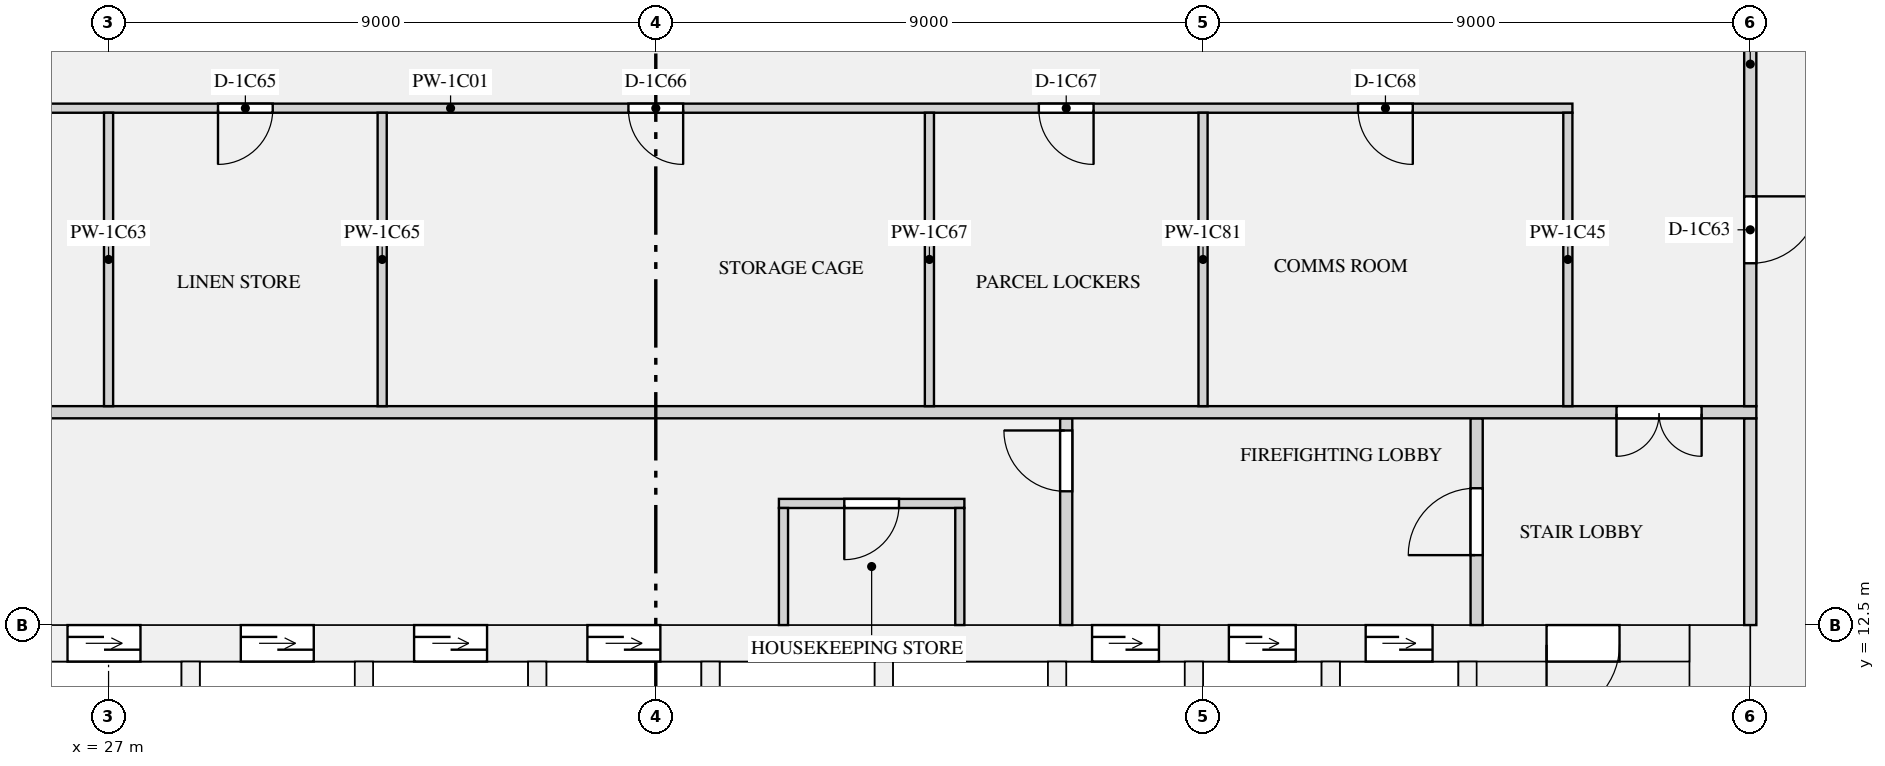
"""IFC4 building model, lengths in metres.
Left out: names, types, materials, properties, quantities, classifications, styles, units other than length and angle.
Written with IfcOpenShell. Run it as: python <this file> out.ifc"""

import sys

from ifc_helpers import new_model, si_unit, direction, frame, frame_2d, origin, place, context, subcontext, project, spatial, rectangle, extrude, element, fill, save


model = new_model("IFC4")
c1 = context("Model", 3, precision=1e-05, world=origin(), true_north=direction((0.0, 1.0)))
c2 = subcontext(c1, "Body", "Model", "MODEL_VIEW")
j1 = project(units=[si_unit("LENGTHUNIT", "METRE"), si_unit("PLANEANGLEUNIT", "RADIAN")], contexts=[c1])
p1 = place(None, origin())
s1 = spatial("IfcSite", under=j1, at=p1, CompositionType="ELEMENT")
p2 = place(p1, origin())
s2 = spatial("IfcBuilding", under=s1, at=p2, CompositionType="ELEMENT")
p3 = place(p2, frame((0.0, 0.0, 38.4)))
s3 = spatial("IfcBuildingStorey", under=s2, at=p3, CompositionType="ELEMENT", Elevation=38.4)
p4 = place(p3, frame((53.5, 0.0, 0.0), z_axis=(0.0, 0.0, 1.0), x_axis=(0.0, 1.0, 0.0)))
e1 = element("IfcWall", 1, at=p4, inside=s3, PredefinedType="SHEAR", context=c2, shape_type="SweptSolid", body=[
    extrude(rectangle(XDim=12.5, YDim=1.0, at=frame_2d((6.25, 0.0))), origin(), (0.0, 0.0, 1.0), 3.15),
])
p5 = place(p3, frame((19.0, 12.2, 0.0), z_axis=(0.0, 0.0, 1.0), x_axis=(1.0, 0.0, 0.0)))
e2 = element("IfcWall", 2, at=p5, inside=s3, PredefinedType="SHEAR", context=c2, shape_type="SweptSolid", body=[
    extrude(rectangle(XDim=34.0, YDim=0.6, at=frame_2d((17.0, 0.0))), origin(), (0.0, 0.0, 1.0), 3.15),
])
p6 = place(p5, frame((4.475, 0.0, 0.0)))
e3 = element("IfcOpeningElement", 3, at=p6, cuts=e2, PredefinedType="OPENING", context=c2, shape_type="SweptSolid", body=[
    extrude(rectangle(XDim=1.2, YDim=2.1, at=frame_2d((0.6, 1.05))), frame((0.0, 0.31, 0.0), z_axis=(0.0, -1.0, 0.0), x_axis=(1.0, 0.0, 0.0)), (0.0, 0.0, 1.0), 0.62),
])
p7 = place(p5, frame((7.325, 0.0, 0.0)))
e4 = element("IfcOpeningElement", 4, at=p7, cuts=e2, PredefinedType="OPENING", context=c2, shape_type="SweptSolid", body=[
    extrude(rectangle(XDim=1.2, YDim=2.1, at=frame_2d((0.6, 1.05))), frame((0.0, 0.31, 0.0), z_axis=(0.0, -1.0, 0.0), x_axis=(1.0, 0.0, 0.0)), (0.0, 0.0, 1.0), 0.62),
])
p8 = place(p5, frame((10.175, 0.0, 0.0)))
e5 = element("IfcOpeningElement", 5, at=p8, cuts=e2, PredefinedType="OPENING", context=c2, shape_type="SweptSolid", body=[
    extrude(rectangle(XDim=1.2, YDim=2.1, at=frame_2d((0.6, 1.05))), frame((0.0, 0.31, 0.0), z_axis=(0.0, -1.0, 0.0), x_axis=(1.0, 0.0, 0.0)), (0.0, 0.0, 1.0), 0.62),
])
p9 = place(p5, frame((13.025, 0.0, 0.0)))
e6 = element("IfcOpeningElement", 6, at=p9, cuts=e2, PredefinedType="OPENING", context=c2, shape_type="SweptSolid", body=[
    extrude(rectangle(XDim=1.2, YDim=2.1, at=frame_2d((0.6, 1.05))), frame((0.0, 0.31, 0.0), z_axis=(0.0, -1.0, 0.0), x_axis=(1.0, 0.0, 0.0)), (0.0, 0.0, 1.0), 0.62),
])
p10 = place(p5, frame((15.875, 0.0, 0.0)))
e7 = element("IfcOpeningElement", 7, at=p10, cuts=e2, PredefinedType="OPENING", context=c2, shape_type="SweptSolid", body=[
    extrude(rectangle(XDim=1.2, YDim=2.1, at=frame_2d((0.6, 1.05))), frame((0.0, 0.31, 0.0), z_axis=(0.0, -1.0, 0.0), x_axis=(1.0, 0.0, 0.0)), (0.0, 0.0, 1.0), 0.62),
])
p11 = place(p5, frame((24.175, 0.0, 0.0)))
e8 = element("IfcOpeningElement", 8, at=p11, cuts=e2, PredefinedType="OPENING", context=c2, shape_type="SweptSolid", body=[
    extrude(rectangle(XDim=1.1, YDim=2.1, at=frame_2d((0.55, 1.05))), frame((0.0, 0.31, 0.0), z_axis=(0.0, -1.0, 0.0), x_axis=(1.0, 0.0, 0.0)), (0.0, 0.0, 1.0), 0.62),
])
p12 = place(p5, frame((26.425, 0.0, 0.0)))
e9 = element("IfcOpeningElement", 9, at=p12, cuts=e2, PredefinedType="OPENING", context=c2, shape_type="SweptSolid", body=[
    extrude(rectangle(XDim=1.1, YDim=2.1, at=frame_2d((0.55, 1.05))), frame((0.0, 0.31, 0.0), z_axis=(0.0, -1.0, 0.0), x_axis=(1.0, 0.0, 0.0)), (0.0, 0.0, 1.0), 0.62),
])
p13 = place(p5, frame((28.675, 0.0, 0.0)))
e10 = element("IfcOpeningElement", 10, at=p13, cuts=e2, PredefinedType="OPENING", context=c2, shape_type="SweptSolid", body=[
    extrude(rectangle(XDim=1.1, YDim=2.1, at=frame_2d((0.55, 1.05))), frame((0.0, 0.31, 0.0), z_axis=(0.0, -1.0, 0.0), x_axis=(1.0, 0.0, 0.0)), (0.0, 0.0, 1.0), 0.62),
])
p14 = place(p5, frame((1.15, 0.0, 0.0)))
e11 = element("IfcOpeningElement", 11, at=p14, cuts=e2, PredefinedType="OPENING", context=c2, shape_type="SweptSolid", body=[
    extrude(rectangle(XDim=1.2, YDim=2.1, at=frame_2d((0.6, 1.05))), frame((0.0, 0.31, 0.0), z_axis=(0.0, -1.0, 0.0), x_axis=(1.0, 0.0, 0.0)), (0.0, 0.0, 1.0), 0.62),
])
p15 = place(p5, frame((31.65, 0.0, 0.0)))
e12 = element("IfcOpeningElement", 12, at=p15, cuts=e2, PredefinedType="OPENING", context=c2, shape_type="SweptSolid", body=[
    extrude(rectangle(XDim=1.2, YDim=2.1, at=frame_2d((0.6, 1.05))), frame((0.0, 0.31, 0.0), z_axis=(0.0, -1.0, 0.0), x_axis=(1.0, 0.0, 0.0)), (0.0, 0.0, 1.0), 0.62),
])
for number, where, z_axis, x_axis in (
    (13, (28.35, 9.35, 0.0), (0.0, 0.0, 1.0), (0.0, 1.0, 0.0)),
    (14, (31.2, 9.35, 0.0), (0.0, 0.0, 1.0), (0.0, 1.0, 0.0)),
    (15, (34.05, 9.35, 0.0), (0.0, 0.0, 1.0), (0.0, 1.0, 0.0)),
    (16, (36.9, 9.35, 0.0), (0.0, 0.0, 1.0), (0.0, 1.0, 0.0)),
    (17, (39.75, 9.35, 0.0), (0.0, 0.0, 1.0), (0.0, 1.0, 0.0)),
):
    element("IfcWall", number, at=place(p3, frame(where, z_axis=z_axis, x_axis=x_axis)), inside=s3, PredefinedType="SHEAR", context=c2, shape_type="SweptSolid", body=[
        extrude(rectangle(XDim=2.55, YDim=0.3, at=frame_2d((1.275, 0.0))), origin(), (0.0, 0.0, 1.0), 3.15),
    ])
for number, where, z_axis, x_axis in (
    (18, (42.6, 8.25, 0.0), (0.0, 0.0, 1.0), (0.0, 1.0, 0.0)),
    (19, (44.85, 8.25, 0.0), (0.0, 0.0, 1.0), (0.0, 1.0, 0.0)),
    (20, (47.1, 8.25, 0.0), (0.0, 0.0, 1.0), (0.0, 1.0, 0.0)),
    (21, (49.35, 8.25, 0.0), (0.0, 0.0, 1.0), (0.0, 1.0, 0.0)),
):
    element("IfcWall", number, at=place(p3, frame(where, z_axis=z_axis, x_axis=x_axis)), inside=s3, PredefinedType="SHEAR", context=c2, shape_type="SweptSolid", body=[
        extrude(rectangle(XDim=3.65, YDim=0.3, at=frame_2d((1.825, 0.0))), origin(), (0.0, 0.0, 1.0), 3.15),
    ])
p16 = place(p3, frame((38.025, 14.5, 0.0), z_axis=(0.0, 0.0, 1.0), x_axis=(1.0, 0.0, 0.0)))
e22 = element("IfcWall", 22, at=p16, inside=s3, PredefinedType="PARTITIONING", context=c2, shape_type="SweptSolid", body=[
    extrude(rectangle(XDim=3.05, YDim=0.15, at=frame_2d((1.525, 0.0))), origin(), (0.0, 0.0, 1.0), 2.83),
])
p17 = place(p16, frame((1.075, 0.0, 0.0)))
e23 = element("IfcOpeningElement", 23, at=p17, cuts=e22, PredefinedType="OPENING", context=c2, shape_type="SweptSolid", body=[
    extrude(rectangle(XDim=0.9, YDim=2.1, at=frame_2d((0.45, 1.05))), frame((0.0, 0.085, 0.0), z_axis=(0.0, -1.0, 0.0), x_axis=(1.0, 0.0, 0.0)), (0.0, 0.0, 1.0), 0.17),
])
for number, where, z_axis, x_axis in (
    (24, (38.1, 12.5, 0.0), (0.0, 0.0, 1.0), (0.0, 1.0, 0.0)),
    (25, (41.0, 12.5, 0.0), (0.0, 0.0, 1.0), (0.0, 1.0, 0.0)),
):
    element("IfcWall", number, at=place(p3, frame(where, z_axis=z_axis, x_axis=x_axis)), inside=s3, PredefinedType="PARTITIONING", context=c2, shape_type="SweptSolid", body=[
        extrude(rectangle(XDim=1.925, YDim=0.15, at=frame_2d((0.962, 0.0))), origin(), (0.0, 0.0, 1.0), 2.83),
    ])
p18 = place(p3, frame((42.75, 12.5, 0.0), z_axis=(0.0, 0.0, 1.0), x_axis=(0.0, 1.0, 0.0)))
e26 = element("IfcWall", 26, at=p18, inside=s3, PredefinedType="PARTITIONING", context=c2, shape_type="SweptSolid", body=[
    extrude(rectangle(XDim=3.4, YDim=0.2, at=frame_2d((1.7, 0.0))), origin(), (0.0, 0.0, 1.0), 2.83),
])
p19 = place(p18, frame((2.2, 0.0, 0.0)))
e27 = element("IfcOpeningElement", 27, at=p19, cuts=e26, PredefinedType="OPENING", context=c2, shape_type="SweptSolid", body=[
    extrude(rectangle(XDim=1.0, YDim=2.1, at=frame_2d((0.5, 1.05))), frame((0.0, 0.11, 0.0), z_axis=(0.0, -1.0, 0.0), x_axis=(1.0, 0.0, 0.0)), (0.0, 0.0, 1.0), 0.22),
])
p20 = place(p3, frame((49.5, 12.5, 0.0), z_axis=(0.0, 0.0, 1.0), x_axis=(0.0, 1.0, 0.0)))
e28 = element("IfcWall", 28, at=p20, inside=s3, PredefinedType="PARTITIONING", context=c2, shape_type="SweptSolid", body=[
    extrude(rectangle(XDim=3.4, YDim=0.2, at=frame_2d((1.7, 0.0))), origin(), (0.0, 0.0, 1.0), 2.83),
])
p21 = place(p20, frame((1.15, 0.0, 0.0)))
e29 = element("IfcOpeningElement", 29, at=p21, cuts=e28, PredefinedType="OPENING", context=c2, shape_type="SweptSolid", body=[
    extrude(rectangle(XDim=1.1, YDim=2.1, at=frame_2d((0.55, 1.05))), frame((0.0, 0.11, 0.0), z_axis=(0.0, -1.0, 0.0), x_axis=(1.0, 0.0, 0.0)), (0.0, 0.0, 1.0), 0.22),
])
p22 = place(p3, frame((54.0, 12.5, 0.0), z_axis=(0.0, 0.0, 1.0), x_axis=(0.0, 1.0, 0.0)))
e30 = element("IfcWall", 30, at=p22, inside=s3, PredefinedType="PARTITIONING", context=c2, shape_type="SweptSolid", body=[
    extrude(rectangle(XDim=3.4, YDim=0.2, at=frame_2d((1.7, 0.0))), origin(), (0.0, 0.0, 1.0), 2.83),
])
p23 = place(p3, frame((20.925, 21.0, 0.0), z_axis=(0.0, 0.0, 1.0), x_axis=(1.0, 0.0, 0.0)))
e31 = element("IfcWall", 31, at=p23, inside=s3, PredefinedType="PARTITIONING", context=c2, shape_type="SweptSolid", body=[
    extrude(rectangle(XDim=30.15, YDim=0.15, at=frame_2d((15.075, 0.0))), origin(), (0.0, 0.0, 1.0), 2.83),
])
p24 = place(p23, frame((2.625, 0.0, 0.0)))
e32 = element("IfcOpeningElement", 32, at=p24, cuts=e31, PredefinedType="OPENING", context=c2, shape_type="SweptSolid", body=[
    extrude(rectangle(XDim=0.9, YDim=2.1, at=frame_2d((0.45, 1.05))), frame((0.0, 0.085, 0.0), z_axis=(0.0, -1.0, 0.0), x_axis=(1.0, 0.0, 0.0)), (0.0, 0.0, 1.0), 0.17),
])
p25 = place(p23, frame((7.875, 0.0, 0.0)))
e33 = element("IfcOpeningElement", 33, at=p25, cuts=e31, PredefinedType="OPENING", context=c2, shape_type="SweptSolid", body=[
    extrude(rectangle(XDim=0.9, YDim=2.1, at=frame_2d((0.45, 1.05))), frame((0.0, 0.085, 0.0), z_axis=(0.0, -1.0, 0.0), x_axis=(1.0, 0.0, 0.0)), (0.0, 0.0, 1.0), 0.17),
])
p26 = place(p23, frame((14.625, 0.0, 0.0)))
e34 = element("IfcOpeningElement", 34, at=p26, cuts=e31, PredefinedType="OPENING", context=c2, shape_type="SweptSolid", body=[
    extrude(rectangle(XDim=0.9, YDim=2.1, at=frame_2d((0.45, 1.05))), frame((0.0, 0.085, 0.0), z_axis=(0.0, -1.0, 0.0), x_axis=(1.0, 0.0, 0.0)), (0.0, 0.0, 1.0), 0.17),
])
p27 = place(p23, frame((21.375, 0.0, 0.0)))
e35 = element("IfcOpeningElement", 35, at=p27, cuts=e31, PredefinedType="OPENING", context=c2, shape_type="SweptSolid", body=[
    extrude(rectangle(XDim=0.9, YDim=2.1, at=frame_2d((0.45, 1.05))), frame((0.0, 0.085, 0.0), z_axis=(0.0, -1.0, 0.0), x_axis=(1.0, 0.0, 0.0)), (0.0, 0.0, 1.0), 0.17),
])
p28 = place(p23, frame((26.625, 0.0, 0.0)))
e36 = element("IfcOpeningElement", 36, at=p28, cuts=e31, PredefinedType="OPENING", context=c2, shape_type="SweptSolid", body=[
    extrude(rectangle(XDim=0.9, YDim=2.1, at=frame_2d((0.45, 1.05))), frame((0.0, 0.085, 0.0), z_axis=(0.0, -1.0, 0.0), x_axis=(1.0, 0.0, 0.0)), (0.0, 0.0, 1.0), 0.17),
])
p29 = place(p3, frame((17.9, 16.0, 0.0), z_axis=(0.0, 0.0, 1.0), x_axis=(1.0, 0.0, 0.0)))
e37 = element("IfcWall", 37, at=p29, inside=s3, PredefinedType="PARTITIONING", context=c2, shape_type="SweptSolid", body=[
    extrude(rectangle(XDim=36.2, YDim=0.2, at=frame_2d((18.1, 0.0))), origin(), (0.0, 0.0, 1.0), 2.83),
])
p30 = place(p29, frame((0.9, 0.0, 0.0)))
e38 = element("IfcOpeningElement", 38, at=p30, cuts=e37, PredefinedType="OPENING", context=c2, shape_type="SweptSolid", body=[
    extrude(rectangle(XDim=1.4, YDim=2.1, at=frame_2d((0.7, 1.05))), frame((0.0, 0.11, 0.0), z_axis=(0.0, -1.0, 0.0), x_axis=(1.0, 0.0, 0.0)), (0.0, 0.0, 1.0), 0.22),
])
p31 = place(p29, frame((33.9, 0.0, 0.0)))
e39 = element("IfcOpeningElement", 39, at=p31, cuts=e37, PredefinedType="OPENING", context=c2, shape_type="SweptSolid", body=[
    extrude(rectangle(XDim=1.4, YDim=2.1, at=frame_2d((0.7, 1.05))), frame((0.0, 0.11, 0.0), z_axis=(0.0, -1.0, 0.0), x_axis=(1.0, 0.0, 0.0)), (0.0, 0.0, 1.0), 0.22),
])
p32 = place(p3, frame((54.0, 16.1, 0.0), z_axis=(0.0, 0.0, 1.0), x_axis=(0.0, 1.0, 0.0)))
e40 = element("IfcWall", 40, at=p32, inside=s3, PredefinedType="PARTITIONING", context=c2, shape_type="SweptSolid", body=[
    extrude(rectangle(XDim=7.8, YDim=0.2, at=frame_2d((3.9, 0.0))), origin(), (0.0, 0.0, 1.0), 2.83),
])
p33 = place(p32, frame((2.35, 0.0, 0.0)))
e41 = element("IfcOpeningElement", 41, at=p33, cuts=e40, PredefinedType="OPENING", context=c2, shape_type="SweptSolid", body=[
    extrude(rectangle(XDim=1.1, YDim=2.1, at=frame_2d((0.55, 1.05))), frame((0.0, 0.11, 0.0), z_axis=(0.0, -1.0, 0.0), x_axis=(1.0, 0.0, 0.0)), (0.0, 0.0, 1.0), 0.22),
])
for number, where, z_axis, x_axis in (
    (42, (51.0, 16.1, 0.0), (0.0, 0.0, 1.0), (0.0, 1.0, 0.0)),
    (43, (27.0, 16.1, 0.0), (0.0, 0.0, 1.0), (0.0, 1.0, 0.0)),
    (44, (31.5, 16.1, 0.0), (0.0, 0.0, 1.0), (0.0, 1.0, 0.0)),
    (45, (40.5, 16.1, 0.0), (0.0, 0.0, 1.0), (0.0, 1.0, 0.0)),
    (46, (45.0, 16.1, 0.0), (0.0, 0.0, 1.0), (0.0, 1.0, 0.0)),
):
    element("IfcWall", number, at=place(p3, frame(where, z_axis=z_axis, x_axis=x_axis)), inside=s3, PredefinedType="PARTITIONING", context=c2, shape_type="SweptSolid", body=[
        extrude(rectangle(XDim=4.825, YDim=0.15, at=frame_2d((2.413, 0.0))), origin(), (0.0, 0.0, 1.0), 2.83),
    ])
p34 = place(p7, origin())
e47 = element("IfcDoor", 47, at=p34, inside=s3, OperationType="DOUBLE_DOOR_SLIDING", PredefinedType="DOOR", context=c2, shape_type="SweptSolid", body=[
    extrude(rectangle(XDim=1.2, YDim=2.1, at=frame_2d((0.6, 1.05))), frame((0.0, 0.025, 0.0), z_axis=(0.0, -1.0, 0.0), x_axis=(1.0, 0.0, 0.0)), (0.0, 0.0, 1.0), 0.05),
])
fill(e4, e47)
p35 = place(p8, origin())
e48 = element("IfcDoor", 48, at=p35, inside=s3, OperationType="DOUBLE_DOOR_SLIDING", PredefinedType="DOOR", context=c2, shape_type="SweptSolid", body=[
    extrude(rectangle(XDim=1.2, YDim=2.1, at=frame_2d((0.6, 1.05))), frame((0.0, 0.025, 0.0), z_axis=(0.0, -1.0, 0.0), x_axis=(1.0, 0.0, 0.0)), (0.0, 0.0, 1.0), 0.05),
])
fill(e5, e48)
p36 = place(p9, origin())
e49 = element("IfcDoor", 49, at=p36, inside=s3, OperationType="DOUBLE_DOOR_SLIDING", PredefinedType="DOOR", context=c2, shape_type="SweptSolid", body=[
    extrude(rectangle(XDim=1.2, YDim=2.1, at=frame_2d((0.6, 1.05))), frame((0.0, 0.025, 0.0), z_axis=(0.0, -1.0, 0.0), x_axis=(1.0, 0.0, 0.0)), (0.0, 0.0, 1.0), 0.05),
])
fill(e6, e49)
p37 = place(p10, origin())
e50 = element("IfcDoor", 50, at=p37, inside=s3, OperationType="DOUBLE_DOOR_SLIDING", PredefinedType="DOOR", context=c2, shape_type="SweptSolid", body=[
    extrude(rectangle(XDim=1.2, YDim=2.1, at=frame_2d((0.6, 1.05))), frame((0.0, 0.025, 0.0), z_axis=(0.0, -1.0, 0.0), x_axis=(1.0, 0.0, 0.0)), (0.0, 0.0, 1.0), 0.05),
])
fill(e7, e50)
p38 = place(p11, origin())
e51 = element("IfcDoor", 51, at=p38, inside=s3, OperationType="DOUBLE_DOOR_SLIDING", PredefinedType="DOOR", context=c2, shape_type="SweptSolid", body=[
    extrude(rectangle(XDim=1.1, YDim=2.1, at=frame_2d((0.55, 1.05))), frame((0.0, 0.025, 0.0), z_axis=(0.0, -1.0, 0.0), x_axis=(1.0, 0.0, 0.0)), (0.0, 0.0, 1.0), 0.05),
])
fill(e8, e51)
p39 = place(p12, origin())
e52 = element("IfcDoor", 52, at=p39, inside=s3, OperationType="DOUBLE_DOOR_SLIDING", PredefinedType="DOOR", context=c2, shape_type="SweptSolid", body=[
    extrude(rectangle(XDim=1.1, YDim=2.1, at=frame_2d((0.55, 1.05))), frame((0.0, 0.025, 0.0), z_axis=(0.0, -1.0, 0.0), x_axis=(1.0, 0.0, 0.0)), (0.0, 0.0, 1.0), 0.05),
])
fill(e9, e52)
p40 = place(p13, origin())
e53 = element("IfcDoor", 53, at=p40, inside=s3, OperationType="DOUBLE_DOOR_SLIDING", PredefinedType="DOOR", context=c2, shape_type="SweptSolid", body=[
    extrude(rectangle(XDim=1.1, YDim=2.1, at=frame_2d((0.55, 1.05))), frame((0.0, 0.025, 0.0), z_axis=(0.0, -1.0, 0.0), x_axis=(1.0, 0.0, 0.0)), (0.0, 0.0, 1.0), 0.05),
])
fill(e10, e53)
p41 = place(p17, frame((0.9, 0.0, 0.0), z_axis=(0.0, 0.0, 1.0), x_axis=(-1.0, 0.0, 0.0)))
e54 = element("IfcDoor", 54, at=p41, inside=s3, OperationType="SINGLE_SWING_RIGHT", PredefinedType="DOOR", context=c2, shape_type="SweptSolid", body=[
    extrude(rectangle(XDim=0.9, YDim=2.1, at=frame_2d((0.45, 1.05))), frame((0.0, 0.025, 0.0), z_axis=(0.0, -1.0, 0.0), x_axis=(1.0, 0.0, 0.0)), (0.0, 0.0, 1.0), 0.05),
])
fill(e23, e54)
p42 = place(p15, frame((1.2, 0.0, 0.0), z_axis=(0.0, 0.0, 1.0), x_axis=(-1.0, 0.0, 0.0)))
e55 = element("IfcDoor", 55, at=p42, inside=s3, OperationType="SINGLE_SWING_RIGHT", PredefinedType="DOOR", context=c2, shape_type="SweptSolid", body=[
    extrude(rectangle(XDim=1.2, YDim=2.1, at=frame_2d((0.6, 1.05))), frame((0.0, 0.025, 0.0), z_axis=(0.0, -1.0, 0.0), x_axis=(1.0, 0.0, 0.0)), (0.0, 0.0, 1.0), 0.05),
])
fill(e12, e55)
p43 = place(p19, origin())
e56 = element("IfcDoor", 56, at=p43, inside=s3, OperationType="SINGLE_SWING_RIGHT", PredefinedType="DOOR", context=c2, shape_type="SweptSolid", body=[
    extrude(rectangle(XDim=1.0, YDim=2.1, at=frame_2d((0.5, 1.05))), frame((0.0, 0.025, 0.0), z_axis=(0.0, -1.0, 0.0), x_axis=(1.0, 0.0, 0.0)), (0.0, 0.0, 1.0), 0.05),
])
fill(e27, e56)
p44 = place(p21, origin())
e57 = element("IfcDoor", 57, at=p44, inside=s3, OperationType="SINGLE_SWING_LEFT", PredefinedType="DOOR", context=c2, shape_type="SweptSolid", body=[
    extrude(rectangle(XDim=1.1, YDim=2.1, at=frame_2d((0.55, 1.05))), frame((0.0, 0.025, 0.0), z_axis=(0.0, -1.0, 0.0), x_axis=(1.0, 0.0, 0.0)), (0.0, 0.0, 1.0), 0.05),
])
fill(e29, e57)
p45 = place(p31, frame((1.4, 0.0, 0.0), z_axis=(0.0, 0.0, 1.0), x_axis=(-1.0, 0.0, 0.0)))
e58 = element("IfcDoor", 58, at=p45, inside=s3, OperationType="DOUBLE_DOOR_SINGLE_SWING", PredefinedType="DOOR", context=c2, shape_type="SweptSolid", body=[
    extrude(rectangle(XDim=1.4, YDim=2.1, at=frame_2d((0.7, 1.05))), frame((0.0, 0.025, 0.0), z_axis=(0.0, -1.0, 0.0), x_axis=(1.0, 0.0, 0.0)), (0.0, 0.0, 1.0), 0.05),
])
fill(e39, e58)
p46 = place(p33, frame((1.1, 0.0, 0.0), z_axis=(0.0, 0.0, 1.0), x_axis=(-1.0, 0.0, 0.0)))
e59 = element("IfcDoor", 59, at=p46, inside=s3, OperationType="SINGLE_SWING_LEFT", PredefinedType="DOOR", context=c2, shape_type="SweptSolid", body=[
    extrude(rectangle(XDim=1.1, YDim=2.1, at=frame_2d((0.55, 1.05))), frame((0.0, 0.025, 0.0), z_axis=(0.0, -1.0, 0.0), x_axis=(1.0, 0.0, 0.0)), (0.0, 0.0, 1.0), 0.05),
])
fill(e41, e59)
p47 = place(p25, frame((0.9, 0.0, 0.0), z_axis=(0.0, 0.0, 1.0), x_axis=(-1.0, 0.0, 0.0)))
e60 = element("IfcDoor", 60, at=p47, inside=s3, OperationType="SINGLE_SWING_RIGHT", PredefinedType="DOOR", context=c2, shape_type="SweptSolid", body=[
    extrude(rectangle(XDim=0.9, YDim=2.1, at=frame_2d((0.45, 1.05))), frame((0.0, 0.025, 0.0), z_axis=(0.0, -1.0, 0.0), x_axis=(1.0, 0.0, 0.0)), (0.0, 0.0, 1.0), 0.05),
])
fill(e33, e60)
p48 = place(p26, frame((0.9, 0.0, 0.0), z_axis=(0.0, 0.0, 1.0), x_axis=(-1.0, 0.0, 0.0)))
e61 = element("IfcDoor", 61, at=p48, inside=s3, OperationType="SINGLE_SWING_LEFT", PredefinedType="DOOR", context=c2, shape_type="SweptSolid", body=[
    extrude(rectangle(XDim=0.9, YDim=2.1, at=frame_2d((0.45, 1.05))), frame((0.0, 0.025, 0.0), z_axis=(0.0, -1.0, 0.0), x_axis=(1.0, 0.0, 0.0)), (0.0, 0.0, 1.0), 0.05),
])
fill(e34, e61)
p49 = place(p27, frame((0.9, 0.0, 0.0), z_axis=(0.0, 0.0, 1.0), x_axis=(-1.0, 0.0, 0.0)))
e62 = element("IfcDoor", 62, at=p49, inside=s3, OperationType="SINGLE_SWING_LEFT", PredefinedType="DOOR", context=c2, shape_type="SweptSolid", body=[
    extrude(rectangle(XDim=0.9, YDim=2.1, at=frame_2d((0.45, 1.05))), frame((0.0, 0.025, 0.0), z_axis=(0.0, -1.0, 0.0), x_axis=(1.0, 0.0, 0.0)), (0.0, 0.0, 1.0), 0.05),
])
fill(e35, e62)
p50 = place(p28, frame((0.9, 0.0, 0.0), z_axis=(0.0, 0.0, 1.0), x_axis=(-1.0, 0.0, 0.0)))
e63 = element("IfcDoor", 63, at=p50, inside=s3, OperationType="SINGLE_SWING_LEFT", PredefinedType="DOOR", context=c2, shape_type="SweptSolid", body=[
    extrude(rectangle(XDim=0.9, YDim=2.1, at=frame_2d((0.45, 1.05))), frame((0.0, 0.025, 0.0), z_axis=(0.0, -1.0, 0.0), x_axis=(1.0, 0.0, 0.0)), (0.0, 0.0, 1.0), 0.05),
])
fill(e36, e63)
save(model, sys.argv[1])
